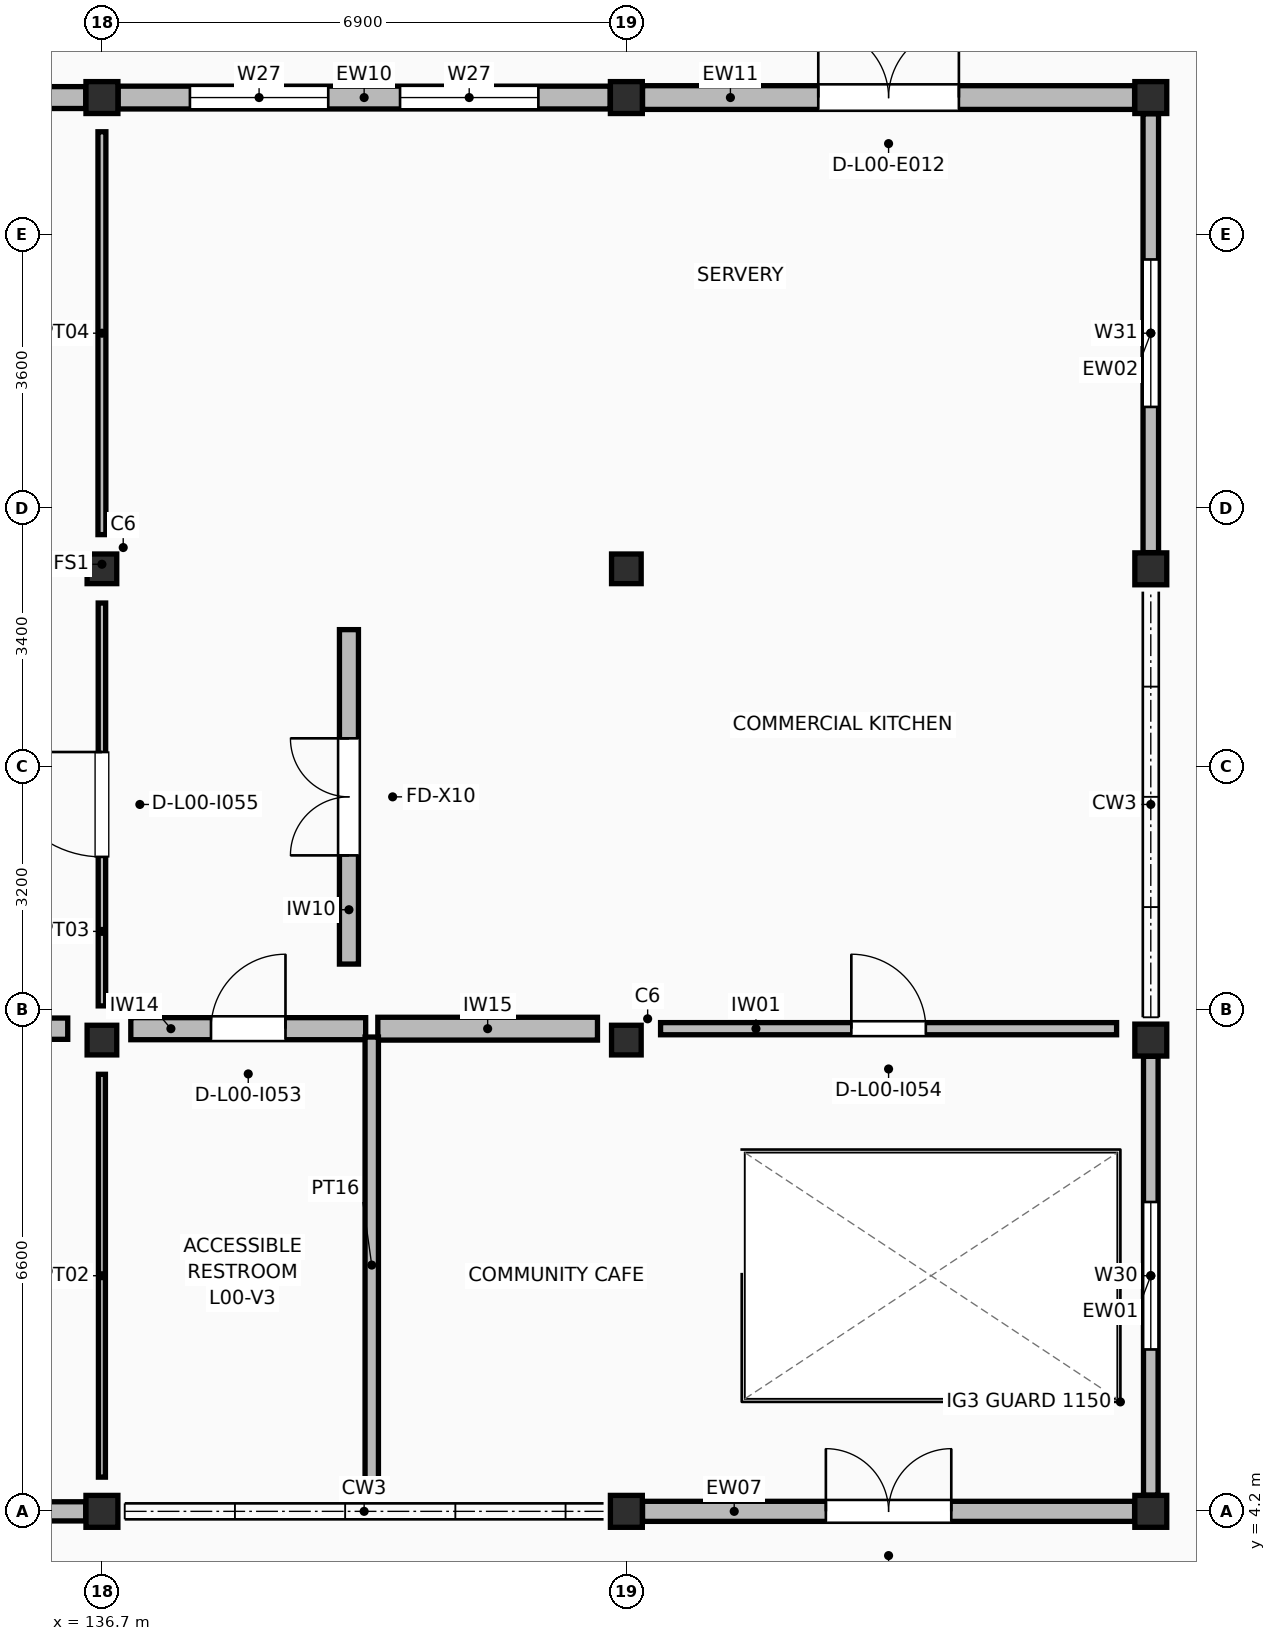
"""IFC4 building model, lengths in metres.
Left out: names, types, materials, properties, quantities, classifications, styles, units other than length and angle.
Written with IfcOpenShell. Run it as: python <this file> out.ifc"""

import sys

from ifc_helpers import new_model, si_unit, direction, frame, frame_2d, origin, origin_2d, place, context, subcontext, project, spatial, rectangle, extrude, element, fill, save


model = new_model("IFC4")
c1 = context("Model", 3, precision=1e-05, world=origin(), true_north=direction((0.0, 1.0)))
c2 = subcontext(c1, "Body", "Model", "MODEL_VIEW")
j1 = project(units=[si_unit("LENGTHUNIT", "METRE"), si_unit("PLANEANGLEUNIT", "RADIAN")], contexts=[c1])
p1 = place(None, origin())
s1 = spatial("IfcSite", under=j1, at=p1, CompositionType="ELEMENT")
p2 = place(p1, origin())
s2 = spatial("IfcBuilding", under=s1, at=p2, CompositionType="ELEMENT")
p3 = place(p2, origin())
s3 = spatial("IfcBuildingStorey", under=s2, at=p3, CompositionType="ELEMENT", Elevation=0.0)
p4 = place(p3, frame((136.7, 4.2, 0.0), z_axis=(0.0, 0.0, 1.0), x_axis=(1.0, 0.0, 0.0)))
e1 = element("IfcColumn", 1, at=p4, inside=s3, PredefinedType="COLUMN", context=c2, shape_type="SweptSolid", body=[
    extrude(rectangle(XDim=0.42, YDim=0.42, at=origin_2d()), origin(), (0.0, 0.0, 1.0), 4.42),
])
for number, where, z_axis, x_axis in (
    (2, (136.7, 10.4, 0.0), (0.0, 0.0, 1.0), (1.0, 0.0, 0.0)),
    (3, (136.7, 16.6, 0.0), (0.0, 0.0, 1.0), (1.0, 0.0, 0.0)),
):
    element("IfcColumn", number, at=place(p3, frame(where, z_axis=z_axis, x_axis=x_axis)), inside=s3, PredefinedType="COLUMN", context=c2, shape_type="SweptSolid", body=[
        extrude(rectangle(XDim=0.39, YDim=0.39, at=origin_2d()), origin(), (0.0, 0.0, 1.0), 4.42),
    ])
for number, where, z_axis, x_axis in (
    (4, (136.7, 22.8, 0.0), (0.0, 0.0, 1.0), (1.0, 0.0, 0.0)),
    (5, (143.6, 4.2, 0.0), (0.0, 0.0, 1.0), (1.0, 0.0, 0.0)),
):
    element("IfcColumn", number, at=place(p3, frame(where, z_axis=z_axis, x_axis=x_axis)), inside=s3, PredefinedType="COLUMN", context=c2, shape_type="SweptSolid", body=[
        extrude(rectangle(XDim=0.42, YDim=0.42, at=origin_2d()), origin(), (0.0, 0.0, 1.0), 4.42),
    ])
for number, where, z_axis, x_axis in (
    (6, (143.6, 10.4, 0.0), (0.0, 0.0, 1.0), (1.0, 0.0, 0.0)),
    (7, (143.6, 16.6, 0.0), (0.0, 0.0, 1.0), (1.0, 0.0, 0.0)),
):
    element("IfcColumn", number, at=place(p3, frame(where, z_axis=z_axis, x_axis=x_axis)), inside=s3, PredefinedType="COLUMN", context=c2, shape_type="SweptSolid", body=[
        extrude(rectangle(XDim=0.39, YDim=0.39, at=origin_2d()), origin(), (0.0, 0.0, 1.0), 4.42),
    ])
for number, where, z_axis, x_axis in (
    (8, (143.6, 22.8, 0.0), (0.0, 0.0, 1.0), (1.0, 0.0, 0.0)),
    (9, (150.5, 4.2, 0.0), (0.0, 0.0, 1.0), (1.0, 0.0, 0.0)),
    (10, (150.5, 10.4, 0.0), (0.0, 0.0, 1.0), (1.0, 0.0, 0.0)),
    (11, (150.5, 16.6, 0.0), (0.0, 0.0, 1.0), (1.0, 0.0, 0.0)),
    (12, (150.5, 22.8, 0.0), (0.0, 0.0, 1.0), (1.0, 0.0, 0.0)),
):
    element("IfcColumn", number, at=place(p3, frame(where, z_axis=z_axis, x_axis=x_axis)), inside=s3, PredefinedType="COLUMN", context=c2, shape_type="SweptSolid", body=[
        extrude(rectangle(XDim=0.42, YDim=0.42, at=origin_2d()), origin(), (0.0, 0.0, 1.0), 4.42),
    ])
p5 = place(p3, frame((130.013, 4.2, 0.0), z_axis=(0.0, 0.0, 1.0), x_axis=(1.0, 0.0, 0.0)))
e13 = element("IfcWall", 13, at=p5, inside=s3, PredefinedType="STANDARD", context=c2, shape_type="SweptSolid", body=[
    extrude(rectangle(XDim=6.474, YDim=0.252, at=frame_2d((3.237, 0.0))), origin(), (0.0, 0.0, 1.0), 3.4),
])
p6 = place(p5, frame((2.462, 0.0, 0.0)))
e14 = element("IfcOpeningElement", 14, at=p6, cuts=e13, PredefinedType="OPENING", context=c2, shape_type="SweptSolid", body=[
    extrude(rectangle(XDim=1.55, YDim=2.22, at=frame_2d((0.775, 1.11))), frame((0.0, 0.136, 0.0), z_axis=(0.0, -1.0, 0.0), x_axis=(1.0, 0.0, 0.0)), (0.0, 0.0, 1.0), 0.272),
])
p7 = place(p3, frame((143.813, 4.2, 0.0), z_axis=(0.0, 0.0, 1.0), x_axis=(1.0, 0.0, 0.0)))
e15 = element("IfcWall", 15, at=p7, inside=s3, PredefinedType="STANDARD", context=c2, shape_type="SweptSolid", body=[
    extrude(rectangle(XDim=6.474, YDim=0.264, at=frame_2d((3.237, 0.0))), origin(), (0.0, 0.0, 1.0), 3.4),
])
p8 = place(p7, frame((2.412, 0.0, 0.0)))
e16 = element("IfcOpeningElement", 16, at=p8, cuts=e15, PredefinedType="OPENING", context=c2, shape_type="SweptSolid", body=[
    extrude(rectangle(XDim=1.65, YDim=2.25, at=frame_2d((0.825, 1.125))), frame((0.0, 0.142, 0.0), z_axis=(0.0, -1.0, 0.0), x_axis=(1.0, 0.0, 0.0)), (0.0, 0.0, 1.0), 0.284),
])
p9 = place(p3, frame((130.013, 22.8, 0.0), z_axis=(0.0, 0.0, 1.0), x_axis=(1.0, 0.0, 0.0)))
e17 = element("IfcWall", 17, at=p9, inside=s3, PredefinedType="STANDARD", context=c2, shape_type="SweptSolid", body=[
    extrude(rectangle(XDim=6.474, YDim=0.288, at=frame_2d((3.237, 0.0))), origin(), (0.0, 0.0, 1.0), 3.4),
])
p10 = place(p9, frame((2.362, 0.0, 0.0)))
e18 = element("IfcOpeningElement", 18, at=p10, cuts=e17, PredefinedType="OPENING", context=c2, shape_type="SweptSolid", body=[
    extrude(rectangle(XDim=1.75, YDim=2.25, at=frame_2d((0.875, 1.125))), frame((0.0, 0.154, 0.0), z_axis=(0.0, -1.0, 0.0), x_axis=(1.0, 0.0, 0.0)), (0.0, 0.0, 1.0), 0.308),
])
p11 = place(p3, frame((136.913, 22.8, 0.0), z_axis=(0.0, 0.0, 1.0), x_axis=(1.0, 0.0, 0.0)))
e19 = element("IfcWall", 19, at=p11, inside=s3, PredefinedType="STANDARD", context=c2, shape_type="SweptSolid", body=[
    extrude(rectangle(XDim=6.474, YDim=0.3, at=frame_2d((3.237, 0.0))), origin(), (0.0, 0.0, 1.0), 3.4),
])
p12 = place(p11, frame((0.945, 0.0, 0.95)))
e20 = element("IfcOpeningElement", 20, at=p12, cuts=e19, PredefinedType="OPENING", context=c2, shape_type="SweptSolid", body=[
    extrude(rectangle(XDim=1.82, YDim=1.45, at=frame_2d((0.91, 0.725))), frame((0.0, 0.16, 0.0), z_axis=(0.0, -1.0, 0.0), x_axis=(1.0, 0.0, 0.0)), (0.0, 0.0, 1.0), 0.32),
])
p13 = place(p11, frame((3.709, 0.0, 0.95)))
e21 = element("IfcOpeningElement", 21, at=p13, cuts=e19, PredefinedType="OPENING", context=c2, shape_type="SweptSolid", body=[
    extrude(rectangle(XDim=1.82, YDim=1.45, at=frame_2d((0.91, 0.725))), frame((0.0, 0.16, 0.0), z_axis=(0.0, -1.0, 0.0), x_axis=(1.0, 0.0, 0.0)), (0.0, 0.0, 1.0), 0.32),
])
p14 = place(p3, frame((143.813, 22.8, 0.0), z_axis=(0.0, 0.0, 1.0), x_axis=(1.0, 0.0, 0.0)))
e22 = element("IfcWall", 22, at=p14, inside=s3, PredefinedType="STANDARD", context=c2, shape_type="SweptSolid", body=[
    extrude(rectangle(XDim=6.474, YDim=0.312, at=frame_2d((3.237, 0.0))), origin(), (0.0, 0.0, 1.0), 3.4),
])
p15 = place(p14, frame((2.312, 0.0, 0.0)))
e23 = element("IfcOpeningElement", 23, at=p15, cuts=e22, PredefinedType="OPENING", context=c2, shape_type="SweptSolid", body=[
    extrude(rectangle(XDim=1.85, YDim=2.28, at=frame_2d((0.925, 1.14))), frame((0.0, 0.166, 0.0), z_axis=(0.0, -1.0, 0.0), x_axis=(1.0, 0.0, 0.0)), (0.0, 0.0, 1.0), 0.332),
])
p16 = place(p3, frame((150.5, 4.413, 0.0), z_axis=(0.0, 0.0, 1.0), x_axis=(0.0, 1.0, 0.0)))
e24 = element("IfcWall", 24, at=p16, inside=s3, PredefinedType="STANDARD", context=c2, shape_type="SweptSolid", body=[
    extrude(rectangle(XDim=5.774, YDim=0.192, at=frame_2d((2.887, 0.0))), origin(), (0.0, 0.0, 1.0), 3.4),
])
p17 = place(p16, frame((1.917, 0.0, 0.95)))
e25 = element("IfcOpeningElement", 25, at=p17, cuts=e24, PredefinedType="OPENING", context=c2, shape_type="SweptSolid", body=[
    extrude(rectangle(XDim=1.94, YDim=1.3, at=frame_2d((0.97, 0.65))), frame((0.0, 0.106, 0.0), z_axis=(0.0, -1.0, 0.0), x_axis=(1.0, 0.0, 0.0)), (0.0, 0.0, 1.0), 0.212),
])
p18 = place(p3, frame((150.5, 16.813, 0.0), z_axis=(0.0, 0.0, 1.0), x_axis=(0.0, 1.0, 0.0)))
e26 = element("IfcWall", 26, at=p18, inside=s3, PredefinedType="STANDARD", context=c2, shape_type="SweptSolid", body=[
    extrude(rectangle(XDim=5.774, YDim=0.204, at=frame_2d((2.887, 0.0))), origin(), (0.0, 0.0, 1.0), 3.4),
])
p19 = place(p18, frame((1.917, 0.0, 0.95)))
e27 = element("IfcOpeningElement", 27, at=p19, cuts=e26, PredefinedType="OPENING", context=c2, shape_type="SweptSolid", body=[
    extrude(rectangle(XDim=1.94, YDim=1.45, at=frame_2d((0.97, 0.725))), frame((0.0, 0.112, 0.0), z_axis=(0.0, -1.0, 0.0), x_axis=(1.0, 0.0, 0.0)), (0.0, 0.0, 1.0), 0.224),
])
p20 = place(p3, frame((130.25, 10.55, 0.0), z_axis=(0.0, 0.0, 1.0), x_axis=(1.0, 0.0, 0.0)))
e28 = element("IfcWall", 28, at=p20, inside=s3, PredefinedType="STANDARD", context=c2, shape_type="SweptSolid", body=[
    extrude(rectangle(XDim=6.0, YDim=0.28, at=frame_2d((3.0, 0.0))), origin(), (0.0, 0.0, 1.0), 3.38),
])
p21 = place(p3, frame((137.08, 10.55, 0.0), z_axis=(0.0, 0.0, 1.0), x_axis=(1.0, 0.0, 0.0)))
e29 = element("IfcWall", 29, at=p21, inside=s3, PredefinedType="STANDARD", context=c2, shape_type="SweptSolid", body=[
    extrude(rectangle(XDim=3.09, YDim=0.29, at=frame_2d((1.545, 0.0))), origin(), (0.0, 0.0, 1.0), 3.38),
])
p22 = place(p21, frame((1.055, 0.0, 0.0)))
e30 = element("IfcOpeningElement", 30, at=p22, cuts=e29, PredefinedType="OPENING", context=c2, shape_type="SweptSolid", body=[
    extrude(rectangle(XDim=0.98, YDim=2.12, at=frame_2d((0.49, 1.06))), frame((0.0, 0.155, 0.0), z_axis=(0.0, -1.0, 0.0), x_axis=(1.0, 0.0, 0.0)), (0.0, 0.0, 1.0), 0.31),
])
p23 = place(p3, frame((140.33, 10.55, 0.0), z_axis=(0.0, 0.0, 1.0), x_axis=(1.0, 0.0, 0.0)))
e31 = element("IfcWall", 31, at=p23, inside=s3, PredefinedType="STANDARD", context=c2, shape_type="SweptSolid", body=[
    extrude(rectangle(XDim=2.89, YDim=0.3, at=frame_2d((1.445, 0.0))), origin(), (0.0, 0.0, 1.0), 3.38),
])
p24 = place(p3, frame((140.25, 4.44, 0.0), z_axis=(0.0, 0.0, 1.0), x_axis=(0.0, 1.0, 0.0)))
e32 = element("IfcWall", 32, at=p24, inside=s3, PredefinedType="PARTITIONING", context=c2, shape_type="SweptSolid", body=[
    extrude(rectangle(XDim=6.0, YDim=0.176, at=frame_2d((3.0, 0.0))), origin(), (0.0, 0.0, 1.0), 3.38),
])
p25 = place(p3, frame((144.05, 10.55, 0.0), z_axis=(0.0, 0.0, 1.0), x_axis=(1.0, 0.0, 0.0)))
e33 = element("IfcWall", 33, at=p25, inside=s3, PredefinedType="STANDARD", context=c2, shape_type="SweptSolid", body=[
    extrude(rectangle(XDim=6.0, YDim=0.16, at=frame_2d((3.0, 0.0))), origin(), (0.0, 0.0, 1.0), 3.38),
])
p26 = place(p25, frame((2.51, 0.0, 0.0)))
e34 = element("IfcOpeningElement", 34, at=p26, cuts=e33, PredefinedType="OPENING", context=c2, shape_type="SweptSolid", body=[
    extrude(rectangle(XDim=0.98, YDim=2.18, at=frame_2d((0.49, 1.09))), frame((0.0, 0.09, 0.0), z_axis=(0.0, -1.0, 0.0), x_axis=(1.0, 0.0, 0.0)), (0.0, 0.0, 1.0), 0.18),
])
p27 = place(p3, frame((136.7, 4.65, 0.0), z_axis=(0.0, 0.0, 1.0), x_axis=(0.0, 1.0, 0.0)))
e35 = element("IfcWall", 35, at=p27, inside=s3, PredefinedType="PARTITIONING", context=c2, shape_type="SweptSolid", body=[
    extrude(rectangle(XDim=5.3, YDim=0.092, at=frame_2d((2.65, 0.0))), origin(), (0.0, 0.0, 1.0), 3.38),
])
p28 = place(p3, frame((136.7, 10.85, 0.0), z_axis=(0.0, 0.0, 1.0), x_axis=(0.0, 1.0, 0.0)))
e36 = element("IfcWall", 36, at=p28, inside=s3, PredefinedType="PARTITIONING", context=c2, shape_type="SweptSolid", body=[
    extrude(rectangle(XDim=5.3, YDim=0.098, at=frame_2d((2.65, 0.0))), origin(), (0.0, 0.0, 1.0), 3.38),
])
p29 = place(p28, frame((1.96, 0.0, 0.0)))
e37 = element("IfcOpeningElement", 37, at=p29, cuts=e36, PredefinedType="OPENING", context=c2, shape_type="SweptSolid", body=[
    extrude(rectangle(XDim=1.38, YDim=2.24, at=frame_2d((0.69, 1.12))), frame((0.0, 0.059, 0.0), z_axis=(0.0, -1.0, 0.0), x_axis=(1.0, 0.0, 0.0)), (0.0, 0.0, 1.0), 0.118),
])
p30 = place(p3, frame((136.7, 17.05, 0.0), z_axis=(0.0, 0.0, 1.0), x_axis=(0.0, 1.0, 0.0)))
e38 = element("IfcWall", 38, at=p30, inside=s3, PredefinedType="PARTITIONING", context=c2, shape_type="SweptSolid", body=[
    extrude(rectangle(XDim=5.3, YDim=0.104, at=frame_2d((2.65, 0.0))), origin(), (0.0, 0.0, 1.0), 3.38),
])
p31 = place(p3, frame((139.95, 11.4, 0.0), z_axis=(0.0, 0.0, 1.0), x_axis=(0.0, 1.0, 0.0)))
e39 = element("IfcWall", 39, at=p31, inside=s3, PredefinedType="STANDARD", context=c2, shape_type="SweptSolid", body=[
    extrude(rectangle(XDim=4.4, YDim=0.25, at=frame_2d((2.2, 0.0))), origin(), (0.0, 0.0, 1.0), 3.38),
])
p32 = place(p31, frame((1.43, 0.0, 0.0)))
e40 = element("IfcOpeningElement", 40, at=p32, cuts=e39, PredefinedType="OPENING", context=c2, shape_type="SweptSolid", body=[
    extrude(rectangle(XDim=1.54, YDim=2.22, at=frame_2d((0.77, 1.11))), frame((0.0, 0.135, 0.0), z_axis=(0.0, -1.0, 0.0), x_axis=(1.0, 0.0, 0.0)), (0.0, 0.0, 1.0), 0.27),
])
p33 = place(p8, frame((1.65, 0.0, 0.0), z_axis=(0.0, 0.0, 1.0), x_axis=(-1.0, 0.0, 0.0)))
e41 = element("IfcDoor", 41, at=p33, inside=s3, OperationType="DOUBLE_DOOR_SINGLE_SWING", PredefinedType="DOOR", context=c2, shape_type="SweptSolid", body=[
    extrude(rectangle(XDim=1.65, YDim=2.25, at=frame_2d((0.825, 1.125))), frame((0.0, 0.025, 0.0), z_axis=(0.0, -1.0, 0.0), x_axis=(1.0, 0.0, 0.0)), (0.0, 0.0, 1.0), 0.05),
])
fill(e16, e41)
p34 = place(p12, origin())
e42 = element("IfcWindow", 42, at=p34, inside=s3, PartitioningType="SINGLE_PANEL", PredefinedType="WINDOW", context=c2, shape_type="SweptSolid", body=[
    extrude(rectangle(XDim=1.82, YDim=1.45, at=frame_2d((0.91, 0.725))), frame((0.0, 0.03, 0.0), z_axis=(0.0, -1.0, 0.0), x_axis=(1.0, 0.0, 0.0)), (0.0, 0.0, 1.0), 0.06),
])
fill(e20, e42)
p35 = place(p13, origin())
e43 = element("IfcWindow", 43, at=p35, inside=s3, PartitioningType="SINGLE_PANEL", PredefinedType="WINDOW", context=c2, shape_type="SweptSolid", body=[
    extrude(rectangle(XDim=1.82, YDim=1.45, at=frame_2d((0.91, 0.725))), frame((0.0, 0.03, 0.0), z_axis=(0.0, -1.0, 0.0), x_axis=(1.0, 0.0, 0.0)), (0.0, 0.0, 1.0), 0.06),
])
fill(e21, e43)
p36 = place(p15, origin())
e44 = element("IfcDoor", 44, at=p36, inside=s3, OperationType="DOUBLE_DOOR_SINGLE_SWING", PredefinedType="DOOR", context=c2, shape_type="SweptSolid", body=[
    extrude(rectangle(XDim=1.85, YDim=2.28, at=frame_2d((0.925, 1.14))), frame((0.0, 0.025, 0.0), z_axis=(0.0, -1.0, 0.0), x_axis=(1.0, 0.0, 0.0)), (0.0, 0.0, 1.0), 0.05),
])
fill(e23, e44)
p37 = place(p17, origin())
e45 = element("IfcWindow", 45, at=p37, inside=s3, PartitioningType="SINGLE_PANEL", PredefinedType="WINDOW", context=c2, shape_type="SweptSolid", body=[
    extrude(rectangle(XDim=1.94, YDim=1.3, at=frame_2d((0.97, 0.65))), frame((0.0, 0.03, 0.0), z_axis=(0.0, -1.0, 0.0), x_axis=(1.0, 0.0, 0.0)), (0.0, 0.0, 1.0), 0.06),
])
fill(e25, e45)
p38 = place(p19, origin())
e46 = element("IfcWindow", 46, at=p38, inside=s3, PartitioningType="SINGLE_PANEL", PredefinedType="WINDOW", context=c2, shape_type="SweptSolid", body=[
    extrude(rectangle(XDim=1.94, YDim=1.45, at=frame_2d((0.97, 0.725))), frame((0.0, 0.03, 0.0), z_axis=(0.0, -1.0, 0.0), x_axis=(1.0, 0.0, 0.0)), (0.0, 0.0, 1.0), 0.06),
])
fill(e27, e46)
p39 = place(p22, origin())
e47 = element("IfcDoor", 47, at=p39, inside=s3, OperationType="SINGLE_SWING_RIGHT", PredefinedType="DOOR", context=c2, shape_type="SweptSolid", body=[
    extrude(rectangle(XDim=0.98, YDim=2.12, at=frame_2d((0.49, 1.06))), frame((0.0, 0.025, 0.0), z_axis=(0.0, -1.0, 0.0), x_axis=(1.0, 0.0, 0.0)), (0.0, 0.0, 1.0), 0.05),
])
fill(e30, e47)
p40 = place(p26, origin())
e48 = element("IfcDoor", 48, at=p40, inside=s3, OperationType="SINGLE_SWING_LEFT", PredefinedType="DOOR", context=c2, shape_type="SweptSolid", body=[
    extrude(rectangle(XDim=0.98, YDim=2.18, at=frame_2d((0.49, 1.09))), frame((0.0, 0.025, 0.0), z_axis=(0.0, -1.0, 0.0), x_axis=(1.0, 0.0, 0.0)), (0.0, 0.0, 1.0), 0.05),
])
fill(e34, e48)
p41 = place(p29, frame((1.38, 0.0, 0.0), z_axis=(0.0, 0.0, 1.0), x_axis=(-1.0, 0.0, 0.0)))
e49 = element("IfcDoor", 49, at=p41, inside=s3, OperationType="SINGLE_SWING_RIGHT", PredefinedType="DOOR", context=c2, shape_type="SweptSolid", body=[
    extrude(rectangle(XDim=1.38, YDim=2.24, at=frame_2d((0.69, 1.12))), frame((0.0, 0.025, 0.0), z_axis=(0.0, -1.0, 0.0), x_axis=(1.0, 0.0, 0.0)), (0.0, 0.0, 1.0), 0.05),
])
fill(e37, e49)
p42 = place(p32, origin())
e50 = element("IfcDoor", 50, at=p42, inside=s3, OperationType="DOUBLE_DOOR_SINGLE_SWING", PredefinedType="DOOR", context=c2, shape_type="SweptSolid", body=[
    extrude(rectangle(XDim=1.54, YDim=2.22, at=frame_2d((0.77, 1.11))), frame((0.0, 0.025, 0.0), z_axis=(0.0, -1.0, 0.0), x_axis=(1.0, 0.0, 0.0)), (0.0, 0.0, 1.0), 0.05),
])
fill(e40, e50)
save(model, sys.argv[1])
